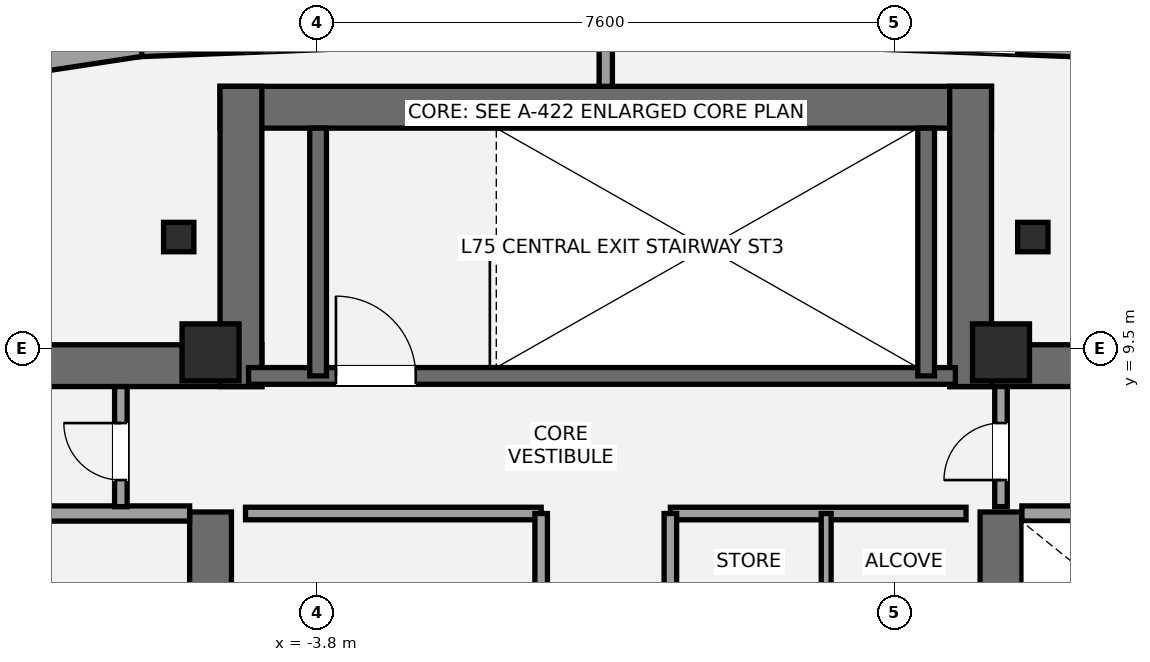
"""IFC4 building model, lengths in metres.
Left out: names, types, materials, properties, quantities, classifications, styles, units other than length and angle.
Written with IfcOpenShell. Run it as: python <this file> out.ifc"""

import sys

from ifc_helpers import new_model, si_unit, direction, frame, frame_2d, origin, origin_2d, place, context, subcontext, project, spatial, rectangle, i_section, extrude, element, fill, save


model = new_model("IFC4")
c1 = context("Model", 3, precision=1e-05, world=origin(), true_north=direction((0.0, 1.0)))
c2 = subcontext(c1, "Body", "Model", "MODEL_VIEW")
j1 = project(units=[si_unit("LENGTHUNIT", "METRE"), si_unit("PLANEANGLEUNIT", "RADIAN")], contexts=[c1])
p1 = place(None, origin())
s1 = spatial("IfcSite", under=j1, at=p1, CompositionType="ELEMENT")
p2 = place(p1, origin())
s2 = spatial("IfcBuilding", under=s1, at=p2, CompositionType="ELEMENT")
p3 = place(p2, frame((0.0, 0.0, 264.8)))
s3 = spatial("IfcBuildingStorey", under=s2, at=p3, CompositionType="ELEMENT", Elevation=264.8)
p4 = place(p3, frame((-13.7, 9.275, 0.0), z_axis=(0.0, 0.0, 1.0), x_axis=(1.0, 0.0, 0.0)))
e1 = element("IfcWall", 1, at=p4, inside=s3, PredefinedType="SHEAR", context=c2, shape_type="SweptSolid", body=[
    extrude(rectangle(XDim=9.175, YDim=0.55, at=frame_2d((4.587, 0.0))), origin(), (0.0, 0.0, 1.0), 4.4),
])
p5 = place(p3, frame((-5.2, 5.35, 0.0), z_axis=(0.0, 0.0, 1.0), x_axis=(0.0, 1.0, 0.0)))
e2 = element("IfcWall", 2, at=p5, inside=s3, PredefinedType="SHEAR", context=c2, shape_type="SweptSolid", body=[
    extrude(rectangle(XDim=2.0, YDim=0.55, at=frame_2d((1.0, 0.0))), origin(), (0.0, 0.0, 1.0), 4.4),
])
p6 = place(p3, frame((4.525, 9.275, 0.0), z_axis=(0.0, 0.0, 1.0), x_axis=(1.0, 0.0, 0.0)))
e3 = element("IfcWall", 3, at=p6, inside=s3, PredefinedType="SHEAR", context=c2, shape_type="SweptSolid", body=[
    extrude(rectangle(XDim=9.175, YDim=0.55, at=frame_2d((4.587, 0.0))), origin(), (0.0, 0.0, 1.0), 4.4),
])
p7 = place(p3, frame((5.2, 5.35, 0.0), z_axis=(0.0, 0.0, 1.0), x_axis=(0.0, 1.0, 0.0)))
e4 = element("IfcWall", 4, at=p7, inside=s3, PredefinedType="SHEAR", context=c2, shape_type="SweptSolid", body=[
    extrude(rectangle(XDim=2.0, YDim=0.55, at=frame_2d((1.0, 0.0))), origin(), (0.0, 0.0, 1.0), 4.4),
])
p8 = place(p3, frame((-5.075, 12.675, 0.0), z_axis=(0.0, 0.0, 1.0), x_axis=(1.0, 0.0, 0.0)))
e5 = element("IfcWall", 5, at=p8, inside=s3, PredefinedType="SHEAR", context=c2, shape_type="SweptSolid", body=[
    extrude(rectangle(XDim=10.15, YDim=0.55, at=frame_2d((5.075, 0.0))), origin(), (0.0, 0.0, 1.0), 4.4),
])
for number, where, z_axis, x_axis in (
    (6, (-4.8, 9.0, 0.0), (0.0, 0.0, 1.0), (0.0, 1.0, 0.0)),
    (7, (4.8, 9.0, 0.0), (0.0, 0.0, 1.0), (0.0, 1.0, 0.0)),
):
    element("IfcWall", number, at=place(p3, frame(where, z_axis=z_axis, x_axis=x_axis)), inside=s3, PredefinedType="SHEAR", context=c2, shape_type="SweptSolid", body=[
        extrude(rectangle(XDim=3.95, YDim=0.55, at=frame_2d((1.975, 0.0))), origin(), (0.0, 0.0, 1.0), 4.4),
    ])
p9 = place(p3, frame((-4.7, 9.14, 0.0), z_axis=(0.0, 0.0, 1.0), x_axis=(1.0, 0.0, 0.0)))
e8 = element("IfcWall", 8, at=p9, inside=s3, PredefinedType="SHEAR", context=c2, shape_type="SweptSolid", body=[
    extrude(rectangle(XDim=9.3, YDim=0.22, at=frame_2d((4.65, 0.0))), origin(), (0.0, 0.0, 1.0), 4.4),
])
p10 = place(p9, frame((1.15, 0.0, 0.0)))
e9 = element("IfcOpeningElement", 9, at=p10, cuts=e8, PredefinedType="OPENING", context=c2, shape_type="SweptSolid", body=[
    extrude(rectangle(XDim=1.05, YDim=2.15, at=frame_2d((0.525, 1.075))), frame((0.0, 0.12, 0.0), z_axis=(0.0, -1.0, 0.0), x_axis=(1.0, 0.0, 0.0)), (0.0, 0.0, 1.0), 0.24),
])
for number, where, z_axis, x_axis in (
    (10, (-3.785, 9.14, 0.0), (0.0, 0.0, 1.0), (0.0, 1.0, 0.0)),
    (11, (4.215, 9.14, 0.0), (0.0, 0.0, 1.0), (0.0, 1.0, 0.0)),
):
    element("IfcWall", number, at=place(p3, frame(where, z_axis=z_axis, x_axis=x_axis)), inside=s3, PredefinedType="SHEAR", context=c2, shape_type="SweptSolid", body=[
        extrude(rectangle(XDim=3.26, YDim=0.22, at=frame_2d((1.63, 0.0))), origin(), (0.0, 0.0, 1.0), 4.4),
    ])
for number, where, z_axis, x_axis in (
    (12, (-5.2, 9.45, 0.0), (0.0, 0.0, 1.0), (1.0, 0.0, 0.0)),
    (13, (5.2, 9.45, 0.0), (0.0, 0.0, 1.0), (1.0, 0.0, 0.0)),
):
    element("IfcColumn", number, at=place(p3, frame(where, z_axis=z_axis, x_axis=x_axis)), inside=s3, PredefinedType="PILASTER", context=c2, shape_type="SweptSolid", body=[
        extrude(rectangle(XDim=0.75, YDim=0.75, at=origin_2d()), origin(), (0.0, 0.0, 1.0), 4.4),
    ])
for number, where, z_axis, x_axis in (
    (14, (5.619, 10.967, 0.0), (0.0, 0.0, 1.0), (1.0, 0.0, 0.0)),
    (15, (-5.619, 10.967, 0.0), (0.0, 0.0, 1.0), (1.0, 0.0, 0.0)),
):
    element("IfcColumn", number, at=place(p3, frame(where, z_axis=z_axis, x_axis=x_axis)), inside=s3, PredefinedType="COLUMN", context=c2, shape_type="SweptSolid", body=[
        extrude(i_section(OverallWidth=0.399, OverallDepth=0.387, WebThickness=0.021, FlangeThickness=0.033, at=origin_2d()), origin(), (0.0, 0.0, 1.0), 4.4),
    ])
p11 = place(p3, frame((6.133, 13.562, 0.0), z_axis=(0.0, 0.0, 1.0), x_axis=(0.988636872831, -0.150323430242, 0.0)))
e16 = element("IfcWall", 16, at=p11, inside=s3, PredefinedType="STANDARD", context=c2, shape_type="SweptSolid", body=[
    extrude(rectangle(XDim=4.244, YDim=0.44, at=frame_2d((2.122, 0.0))), origin(), (0.0, 0.0, 1.0), 3.566),
])
p12 = place(p11, frame((1.422, 0.0, 0.6)))
e17 = element("IfcOpeningElement", 17, at=p12, cuts=e16, PredefinedType="OPENING", context=c2, shape_type="SweptSolid", body=[
    extrude(rectangle(XDim=1.4, YDim=1.55, at=frame_2d((0.7, 0.775))), frame((0.0, 0.23, 0.0), z_axis=(0.0, -1.0, 0.0), x_axis=(1.0, 0.0, 0.0)), (0.0, 0.0, 1.0), 0.46),
])
p13 = place(p3, frame((2.017, 13.719, 0.0), z_axis=(0.0, 0.0, 1.0), x_axis=(0.999255070078, -0.038591513614, 0.0)))
e18 = element("IfcWall", 18, at=p13, inside=s3, PredefinedType="STANDARD", context=c2, shape_type="SweptSolid", body=[
    extrude(rectangle(XDim=4.144, YDim=0.44, at=frame_2d((2.072, 0.0))), origin(), (0.0, 0.0, 1.0), 3.566),
])
p14 = place(p13, frame((1.396, 0.0, 0.6)))
e19 = element("IfcOpeningElement", 19, at=p14, cuts=e18, PredefinedType="OPENING", context=c2, shape_type="SweptSolid", body=[
    extrude(rectangle(XDim=2.0, YDim=2.1, at=frame_2d((1.0, 1.05))), frame((0.0, 0.23, 0.0), z_axis=(0.0, -1.0, 0.0), x_axis=(1.0, 0.0, 0.0)), (0.0, 0.0, 1.0), 0.46),
])
p15 = place(p3, frame((-6.157, 13.559, 0.0), z_axis=(0.0, 0.0, 1.0), x_axis=(0.999255070078, 0.038591513614, 0.0)))
e20 = element("IfcWall", 20, at=p15, inside=s3, PredefinedType="STANDARD", context=c2, shape_type="SweptSolid", body=[
    extrude(rectangle(XDim=4.144, YDim=0.44, at=frame_2d((2.072, 0.0))), origin(), (0.0, 0.0, 1.0), 3.566),
])
p16 = place(p15, frame((1.396, 0.0, 0.6)))
e21 = element("IfcOpeningElement", 21, at=p16, cuts=e20, PredefinedType="OPENING", context=c2, shape_type="SweptSolid", body=[
    extrude(rectangle(XDim=2.0, YDim=2.1, at=frame_2d((1.0, 1.05))), frame((0.0, 0.23, 0.0), z_axis=(0.0, -1.0, 0.0), x_axis=(1.0, 0.0, 0.0)), (0.0, 0.0, 1.0), 0.46),
])
p17 = place(p3, frame((-10.328, 12.924, 0.0), z_axis=(0.0, 0.0, 1.0), x_axis=(0.988636872831, 0.150323430242, 0.0)))
e22 = element("IfcWall", 22, at=p17, inside=s3, PredefinedType="STANDARD", context=c2, shape_type="SweptSolid", body=[
    extrude(rectangle(XDim=4.244, YDim=0.44, at=frame_2d((2.122, 0.0))), origin(), (0.0, 0.0, 1.0), 3.566),
])
p18 = place(p17, frame((0.798, 0.0, 0.6)))
e23 = element("IfcOpeningElement", 23, at=p18, cuts=e22, PredefinedType="OPENING", context=c2, shape_type="SweptSolid", body=[
    extrude(rectangle(XDim=2.0, YDim=2.1, at=frame_2d((1.0, 1.05))), frame((0.0, 0.23, 0.0), z_axis=(0.0, -1.0, 0.0), x_axis=(1.0, 0.0, 0.0)), (0.0, 0.0, 1.0), 0.46),
])
for number, where, z_axis, x_axis in (
    (24, (-9.78, 7.33, 0.0), (0.0, 0.0, 1.0), (1.0, 0.0, 0.0)),
    (25, (5.475, 7.33, 0.0), (0.0, 0.0, 1.0), (1.0, 0.0, 0.0)),
):
    element("IfcWall", number, at=place(p3, frame(where, z_axis=z_axis, x_axis=x_axis)), inside=s3, PredefinedType="SOLIDWALL", context=c2, shape_type="SweptSolid", body=[
        extrude(rectangle(XDim=4.305, YDim=0.2, at=frame_2d((2.152, 0.0))), origin(), (0.0, 0.0, 1.0), 4.2),
    ])
p19 = place(p3, frame((-4.74, 7.33, 0.0), z_axis=(0.0, 0.0, 1.0), x_axis=(1.0, 0.0, 0.0)))
e26 = element("IfcWall", 26, at=p19, inside=s3, PredefinedType="PARTITIONING", context=c2, shape_type="SweptSolid", body=[
    extrude(rectangle(XDim=3.89, YDim=0.165, at=frame_2d((1.945, 0.0))), origin(), (0.0, 0.0, 1.0), 4.2),
])
p20 = place(p3, frame((-0.85, 5.52, 0.0), z_axis=(0.0, 0.0, 1.0), x_axis=(0.0, 1.0, 0.0)))
e27 = element("IfcWall", 27, at=p20, inside=s3, PredefinedType="PARTITIONING", context=c2, shape_type="SweptSolid", body=[
    extrude(rectangle(XDim=1.81, YDim=0.165, at=frame_2d((0.905, 0.0))), origin(), (0.0, 0.0, 1.0), 4.2),
])
p21 = place(p3, frame((0.85, 7.33, 0.0), z_axis=(0.0, 0.0, 1.0), x_axis=(1.0, 0.0, 0.0)))
e28 = element("IfcWall", 28, at=p21, inside=s3, PredefinedType="PARTITIONING", context=c2, shape_type="SweptSolid", body=[
    extrude(rectangle(XDim=3.89, YDim=0.165, at=frame_2d((1.945, 0.0))), origin(), (0.0, 0.0, 1.0), 4.2),
])
p22 = place(p3, frame((0.85, 5.52, 0.0), z_axis=(0.0, 0.0, 1.0), x_axis=(0.0, 1.0, 0.0)))
e29 = element("IfcWall", 29, at=p22, inside=s3, PredefinedType="PARTITIONING", context=c2, shape_type="SweptSolid", body=[
    extrude(rectangle(XDim=1.81, YDim=0.165, at=frame_2d((0.905, 0.0))), origin(), (0.0, 0.0, 1.0), 4.2),
])
p23 = place(p3, frame((2.9, 5.52, 0.0), z_axis=(0.0, 0.0, 1.0), x_axis=(0.0, 1.0, 0.0)))
e30 = element("IfcWall", 30, at=p23, inside=s3, PredefinedType="PARTITIONING", context=c2, shape_type="SweptSolid", body=[
    extrude(rectangle(XDim=1.81, YDim=0.13, at=frame_2d((0.905, 0.0))), origin(), (0.0, 0.0, 1.0), 4.2),
])
p24 = place(p3, frame((-6.38, 7.42, 0.0), z_axis=(0.0, 0.0, 1.0), x_axis=(0.0, 1.0, 0.0)))
e31 = element("IfcWall", 31, at=p24, inside=s3, PredefinedType="PARTITIONING", context=c2, shape_type="SweptSolid", body=[
    extrude(rectangle(XDim=1.58, YDim=0.165, at=frame_2d((0.79, 0.0))), origin(), (0.0, 0.0, 1.0), 4.2),
])
p25 = place(p24, frame((0.35, 0.0, 0.0)))
e32 = element("IfcOpeningElement", 32, at=p25, cuts=e31, PredefinedType="OPENING", context=c2, shape_type="SweptSolid", body=[
    extrude(rectangle(XDim=0.75, YDim=2.1, at=frame_2d((0.375, 1.05))), frame((0.0, 0.093, 0.0), z_axis=(0.0, -1.0, 0.0), x_axis=(1.0, 0.0, 0.0)), (0.0, 0.0, 1.0), 0.185),
])
p26 = place(p3, frame((5.2, 7.42, 0.0), z_axis=(0.0, 0.0, 1.0), x_axis=(0.0, 1.0, 0.0)))
e33 = element("IfcWall", 33, at=p26, inside=s3, PredefinedType="PARTITIONING", context=c2, shape_type="SweptSolid", body=[
    extrude(rectangle(XDim=1.58, YDim=0.165, at=frame_2d((0.79, 0.0))), origin(), (0.0, 0.0, 1.0), 4.2),
])
p27 = place(p26, frame((0.35, 0.0, 0.0)))
e34 = element("IfcOpeningElement", 34, at=p27, cuts=e33, PredefinedType="OPENING", context=c2, shape_type="SweptSolid", body=[
    extrude(rectangle(XDim=0.75, YDim=2.1, at=frame_2d((0.375, 1.05))), frame((0.0, 0.093, 0.0), z_axis=(0.0, -1.0, 0.0), x_axis=(1.0, 0.0, 0.0)), (0.0, 0.0, 1.0), 0.185),
])
p28 = place(p3, frame((0.0, 12.95, 0.0), z_axis=(0.0, 0.0, 1.0), x_axis=(0.0, 1.0, 0.0)))
e35 = element("IfcWall", 35, at=p28, inside=s3, PredefinedType="PARTITIONING", context=c2, shape_type="SweptSolid", body=[
    extrude(rectangle(XDim=0.541, YDim=0.175, at=frame_2d((0.271, 0.0))), origin(), (0.0, 0.0, 1.0), 4.2),
])
p29 = place(p10, origin())
e36 = element("IfcDoor", 36, at=p29, inside=s3, OperationType="SINGLE_SWING_LEFT", PredefinedType="DOOR", context=c2, shape_type="SweptSolid", body=[
    extrude(rectangle(XDim=1.05, YDim=2.15, at=frame_2d((0.525, 1.075))), frame((0.0, 0.025, 0.0), z_axis=(0.0, -1.0, 0.0), x_axis=(1.0, 0.0, 0.0)), (0.0, 0.0, 1.0), 0.05),
])
fill(e9, e36)
p30 = place(p25, origin())
e37 = element("IfcDoor", 37, at=p30, inside=s3, OperationType="SINGLE_SWING_RIGHT", PredefinedType="DOOR", context=c2, shape_type="SweptSolid", body=[
    extrude(rectangle(XDim=0.75, YDim=2.1, at=frame_2d((0.375, 1.05))), frame((0.0, 0.025, 0.0), z_axis=(0.0, -1.0, 0.0), x_axis=(1.0, 0.0, 0.0)), (0.0, 0.0, 1.0), 0.05),
])
fill(e32, e37)
p31 = place(p27, origin())
e38 = element("IfcDoor", 38, at=p31, inside=s3, OperationType="SINGLE_SWING_LEFT", PredefinedType="DOOR", context=c2, shape_type="SweptSolid", body=[
    extrude(rectangle(XDim=0.75, YDim=2.1, at=frame_2d((0.375, 1.05))), frame((0.0, 0.025, 0.0), z_axis=(0.0, -1.0, 0.0), x_axis=(1.0, 0.0, 0.0)), (0.0, 0.0, 1.0), 0.05),
])
fill(e34, e38)
save(model, sys.argv[1])
